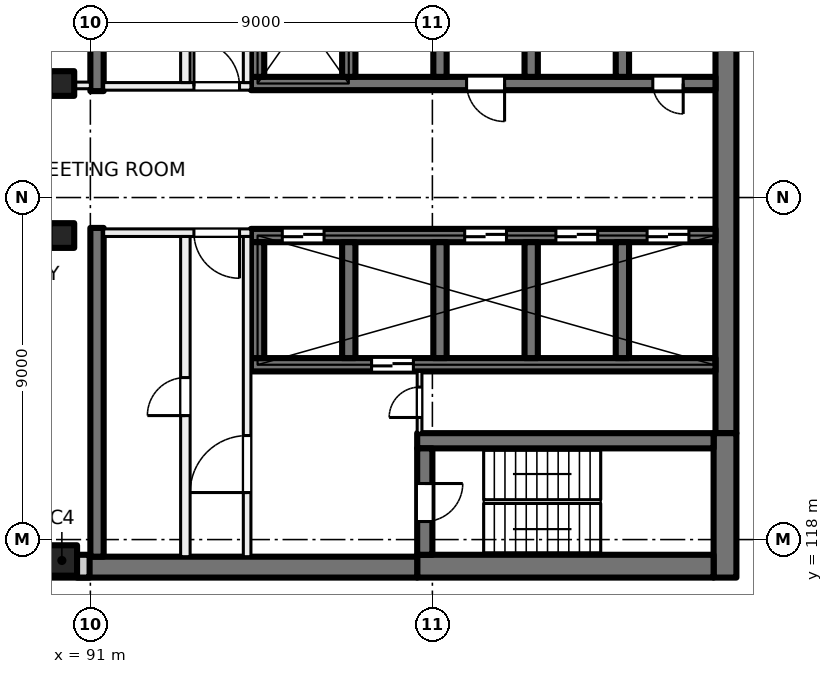
"""IFC4 building model, lengths in metres.
Left out: names, types, materials, properties, quantities, classifications, styles, units other than length and angle.
Written with IfcOpenShell. Run it as: python <this file> out.ifc"""

import sys

from ifc_helpers import new_model, si_unit, direction, frame, frame_2d, origin, origin_2d, place, context, subcontext, project, spatial, rectangle, extrude, element, fill, save


model = new_model("IFC4")
c1 = context("Model", 3, precision=1e-05, world=origin(), true_north=direction((0.0, 1.0)))
c2 = subcontext(c1, "Body", "Model", "MODEL_VIEW")
j1 = project(units=[si_unit("LENGTHUNIT", "METRE"), si_unit("PLANEANGLEUNIT", "RADIAN")], contexts=[c1])
p1 = place(None, origin())
s1 = spatial("IfcSite", under=j1, at=p1, CompositionType="ELEMENT")
p2 = place(p1, origin())
s2 = spatial("IfcBuilding", under=s1, at=p2, CompositionType="ELEMENT")
p3 = place(p2, frame((0.0, 0.0, 174.5)))
s3 = spatial("IfcBuildingStorey", under=s2, at=p3, CompositionType="ELEMENT", Elevation=174.5)
for number, where, z_axis, x_axis in (
    (1, (90.25, 130.0, 0.0), (0.0, 0.0, 1.0), (1.0, 0.0, 0.0)),
    (2, (90.25, 126.0, 0.0), (0.0, 0.0, 1.0), (1.0, 0.0, 0.0)),
):
    element("IfcColumn", number, at=place(p3, frame(where, z_axis=z_axis, x_axis=x_axis)), inside=s3, PredefinedType="COLUMN", context=c2, shape_type="SweptSolid", body=[
        extrude(rectangle(XDim=0.65, YDim=0.65, at=origin_2d()), origin(), (0.0, 0.0, 1.0), 4.0),
    ])
p4 = place(p3, frame((90.25, 117.45, 0.0), z_axis=(0.0, 0.0, 1.0), x_axis=(1.0, 0.0, 0.0)))
e3 = element("IfcColumn", 3, at=p4, inside=s3, PredefinedType="COLUMN", context=c2, shape_type="SweptSolid", body=[
    extrude(rectangle(XDim=0.8, YDim=0.8, at=origin_2d()), origin(), (0.0, 0.0, 1.0), 4.0),
])
p5 = place(p3, frame((107.725, 135.2, 0.0), z_axis=(0.0, 0.0, 1.0), x_axis=(0.0, -1.0, 0.0)))
e4 = element("IfcWall", 4, at=p5, inside=s3, PredefinedType="SHEAR", context=c2, shape_type="SweptSolid", body=[
    extrude(rectangle(XDim=14.4, YDim=0.55, at=frame_2d((7.2, 0.0))), origin(), (0.0, 0.0, 1.0), 4.0),
])
p6 = place(p3, frame((107.7, 120.8, 0.0), z_axis=(0.0, 0.0, 1.0), x_axis=(0.0, -1.0, 0.0)))
e5 = element("IfcWall", 5, at=p6, inside=s3, PredefinedType="SHEAR", context=c2, shape_type="SweptSolid", body=[
    extrude(rectangle(XDim=3.8, YDim=0.6, at=frame_2d((1.9, 0.0))), origin(), (0.0, 0.0, 1.0), 4.0),
])
p7 = place(p3, frame((107.4, 117.3, 0.0), z_axis=(0.0, 0.0, 1.0), x_axis=(-1.0, 0.0, 0.0)))
e6 = element("IfcWall", 6, at=p7, inside=s3, PredefinedType="SHEAR", context=c2, shape_type="SweptSolid", body=[
    extrude(rectangle(XDim=7.8, YDim=0.6, at=frame_2d((3.9, 0.0))), origin(), (0.0, 0.0, 1.0), 4.0),
])
p8 = place(p3, frame((99.6, 117.275, 0.0), z_axis=(0.0, 0.0, 1.0), x_axis=(-1.0, 0.0, 0.0)))
e7 = element("IfcWall", 7, at=p8, inside=s3, PredefinedType="SHEAR", context=c2, shape_type="SweptSolid", body=[
    extrude(rectangle(XDim=8.95, YDim=0.55, at=frame_2d((4.475, 0.0))), origin(), (0.0, 0.0, 1.0), 4.0),
])
p9 = place(p3, frame((107.4, 120.6, 0.0), z_axis=(0.0, 0.0, 1.0), x_axis=(-1.0, 0.0, 0.0)))
e8 = element("IfcWall", 8, at=p9, inside=s3, PredefinedType="SHEAR", context=c2, shape_type="SweptSolid", body=[
    extrude(rectangle(XDim=7.8, YDim=0.4, at=frame_2d((3.9, 0.0))), origin(), (0.0, 0.0, 1.0), 4.0),
])
p10 = place(p3, frame((99.8, 120.4, 0.0), z_axis=(0.0, 0.0, 1.0), x_axis=(0.0, -1.0, 0.0)))
e9 = element("IfcWall", 9, at=p10, inside=s3, PredefinedType="SHEAR", context=c2, shape_type="SweptSolid", body=[
    extrude(rectangle(XDim=2.8, YDim=0.4, at=frame_2d((1.4, 0.0))), origin(), (0.0, 0.0, 1.0), 4.0),
])
p11 = place(p10, frame((0.925, 0.0, 0.0)))
e10 = element("IfcOpeningElement", 10, at=p11, cuts=e9, PredefinedType="OPENING", context=c2, shape_type="SweptSolid", body=[
    extrude(rectangle(XDim=1.0, YDim=2.1, at=frame_2d((0.5, 1.05))), frame((0.0, 0.21, 0.0), z_axis=(0.0, -1.0, 0.0), x_axis=(1.0, 0.0, 0.0)), (0.0, 0.0, 1.0), 0.42),
])
p12 = place(p3, frame((107.45, 130.0, 0.0), z_axis=(0.0, 0.0, 1.0), x_axis=(-1.0, 0.0, 0.0)))
e11 = element("IfcWall", 11, at=p12, inside=s3, PredefinedType="SHEAR", context=c2, shape_type="SweptSolid", body=[
    extrude(rectangle(XDim=12.225, YDim=0.35, at=frame_2d((6.112, 0.0))), origin(), (0.0, 0.0, 1.0), 4.0),
])
p13 = place(p12, frame((0.85, 0.0, 0.0)))
e12 = element("IfcOpeningElement", 12, at=p13, cuts=e11, PredefinedType="OPENING", context=c2, shape_type="SweptSolid", body=[
    extrude(rectangle(XDim=0.8, YDim=2.1, at=frame_2d((0.4, 1.05))), frame((0.0, 0.185, 0.0), z_axis=(0.0, -1.0, 0.0), x_axis=(1.0, 0.0, 0.0)), (0.0, 0.0, 1.0), 0.37),
])
p14 = place(p12, frame((5.55, 0.0, 0.0)))
e13 = element("IfcOpeningElement", 13, at=p14, cuts=e11, PredefinedType="OPENING", context=c2, shape_type="SweptSolid", body=[
    extrude(rectangle(XDim=1.0, YDim=2.1, at=frame_2d((0.5, 1.05))), frame((0.0, 0.185, 0.0), z_axis=(0.0, -1.0, 0.0), x_axis=(1.0, 0.0, 0.0)), (0.0, 0.0, 1.0), 0.37),
])
for number, where, z_axis, x_axis in (
    (14, (105.0, 133.225, 0.0), (0.0, 0.0, 1.0), (0.0, -1.0, 0.0)),
    (15, (102.6, 133.225, 0.0), (0.0, 0.0, 1.0), (0.0, -1.0, 0.0)),
    (16, (100.2, 133.225, 0.0), (0.0, 0.0, 1.0), (0.0, -1.0, 0.0)),
    (17, (97.8, 133.225, 0.0), (0.0, 0.0, 1.0), (0.0, -1.0, 0.0)),
    (18, (95.4, 133.225, 0.0), (0.0, 0.0, 1.0), (0.0, -1.0, 0.0)),
):
    element("IfcWall", number, at=place(p3, frame(where, z_axis=z_axis, x_axis=x_axis)), inside=s3, PredefinedType="SHEAR", context=c2, shape_type="SweptSolid", body=[
        extrude(rectangle(XDim=3.05, YDim=0.35, at=frame_2d((1.525, 0.0))), origin(), (0.0, 0.0, 1.0), 4.0),
    ])
p15 = place(p3, frame((107.45, 126.0, 0.0), z_axis=(0.0, 0.0, 1.0), x_axis=(-1.0, 0.0, 0.0)))
e19 = element("IfcWall", 19, at=p15, inside=s3, PredefinedType="SHEAR", context=c2, shape_type="SweptSolid", body=[
    extrude(rectangle(XDim=12.225, YDim=0.35, at=frame_2d((6.112, 0.0))), origin(), (0.0, 0.0, 1.0), 4.0),
])
p16 = place(p15, frame((0.7, 0.0, 0.0)))
e20 = element("IfcOpeningElement", 20, at=p16, cuts=e19, PredefinedType="OPENING", context=c2, shape_type="SweptSolid", body=[
    extrude(rectangle(XDim=1.1, YDim=2.1, at=frame_2d((0.55, 1.05))), frame((0.0, 0.185, 0.0), z_axis=(0.0, -1.0, 0.0), x_axis=(1.0, 0.0, 0.0)), (0.0, 0.0, 1.0), 0.37),
])
p17 = place(p15, frame((3.1, 0.0, 0.0)))
e21 = element("IfcOpeningElement", 21, at=p17, cuts=e19, PredefinedType="OPENING", context=c2, shape_type="SweptSolid", body=[
    extrude(rectangle(XDim=1.1, YDim=2.1, at=frame_2d((0.55, 1.05))), frame((0.0, 0.185, 0.0), z_axis=(0.0, -1.0, 0.0), x_axis=(1.0, 0.0, 0.0)), (0.0, 0.0, 1.0), 0.37),
])
p18 = place(p15, frame((5.5, 0.0, 0.0)))
e22 = element("IfcOpeningElement", 22, at=p18, cuts=e19, PredefinedType="OPENING", context=c2, shape_type="SweptSolid", body=[
    extrude(rectangle(XDim=1.1, YDim=2.1, at=frame_2d((0.55, 1.05))), frame((0.0, 0.185, 0.0), z_axis=(0.0, -1.0, 0.0), x_axis=(1.0, 0.0, 0.0)), (0.0, 0.0, 1.0), 0.37),
])
p19 = place(p15, frame((10.3, 0.0, 0.0)))
e23 = element("IfcOpeningElement", 23, at=p19, cuts=e19, PredefinedType="OPENING", context=c2, shape_type="SweptSolid", body=[
    extrude(rectangle(XDim=1.1, YDim=2.1, at=frame_2d((0.55, 1.05))), frame((0.0, 0.185, 0.0), z_axis=(0.0, -1.0, 0.0), x_axis=(1.0, 0.0, 0.0)), (0.0, 0.0, 1.0), 0.37),
])
p20 = place(p3, frame((107.45, 122.6, 0.0), z_axis=(0.0, 0.0, 1.0), x_axis=(-1.0, 0.0, 0.0)))
e24 = element("IfcWall", 24, at=p20, inside=s3, PredefinedType="SHEAR", context=c2, shape_type="SweptSolid", body=[
    extrude(rectangle(XDim=12.225, YDim=0.35, at=frame_2d((6.112, 0.0))), origin(), (0.0, 0.0, 1.0), 4.0),
])
p21 = place(p20, frame((7.95, 0.0, 0.0)))
e25 = element("IfcOpeningElement", 25, at=p21, cuts=e24, PredefinedType="OPENING", context=c2, shape_type="SweptSolid", body=[
    extrude(rectangle(XDim=1.1, YDim=2.1, at=frame_2d((0.55, 1.05))), frame((0.0, 0.185, 0.0), z_axis=(0.0, -1.0, 0.0), x_axis=(1.0, 0.0, 0.0)), (0.0, 0.0, 1.0), 0.37),
])
for number, where, z_axis, x_axis in (
    (26, (105.0, 125.825, 0.0), (0.0, 0.0, 1.0), (0.0, -1.0, 0.0)),
    (27, (102.6, 125.825, 0.0), (0.0, 0.0, 1.0), (0.0, -1.0, 0.0)),
    (28, (100.2, 125.825, 0.0), (0.0, 0.0, 1.0), (0.0, -1.0, 0.0)),
    (29, (97.8, 125.825, 0.0), (0.0, 0.0, 1.0), (0.0, -1.0, 0.0)),
    (30, (95.4, 125.825, 0.0), (0.0, 0.0, 1.0), (0.0, -1.0, 0.0)),
):
    element("IfcWall", number, at=place(p3, frame(where, z_axis=z_axis, x_axis=x_axis)), inside=s3, PredefinedType="SHEAR", context=c2, shape_type="SweptSolid", body=[
        extrude(rectangle(XDim=3.05, YDim=0.35, at=frame_2d((1.525, 0.0))), origin(), (0.0, 0.0, 1.0), 4.0),
    ])
for number, where, z_axis, x_axis in (
    (31, (91.175, 138.45, 0.0), (0.0, 0.0, 1.0), (0.0, -1.0, 0.0)),
    (32, (91.175, 126.2, 0.0), (0.0, 0.0, 1.0), (0.0, -1.0, 0.0)),
):
    element("IfcWall", number, at=place(p3, frame(where, z_axis=z_axis, x_axis=x_axis)), inside=s3, PredefinedType="SHEAR", context=c2, shape_type="SweptSolid", body=[
        extrude(rectangle(XDim=8.65, YDim=0.35, at=frame_2d((4.325, 0.0))), origin(), (0.0, 0.0, 1.0), 4.0),
    ])
p22 = place(p3, frame((90.98, 117.3, 0.0), z_axis=(0.0, 0.0, 1.0), x_axis=(-1.0, 0.0, 0.0)))
e33 = element("IfcWall", 33, at=p22, inside=s3, PredefinedType="SOLIDWALL", context=c2, shape_type="SweptSolid", body=[
    extrude(rectangle(XDim=33.745, YDim=0.6, at=frame_2d((16.873, 0.0))), origin(), (0.0, 0.0, 1.0), 3.625),
])
p23 = place(p22, frame((1.48, 0.0, 0.9)))
e34 = element("IfcOpeningElement", 34, at=p23, cuts=e33, PredefinedType="OPENING", context=c2, shape_type="SweptSolid", body=[
    extrude(rectangle(XDim=3.0, YDim=2.4, at=frame_2d((1.5, 1.2))), frame((0.0, 0.31, 0.0), z_axis=(0.0, -1.0, 0.0), x_axis=(1.0, 0.0, 0.0)), (0.0, 0.0, 1.0), 0.62),
])
p24 = place(p22, frame((5.98, 0.0, 0.9)))
e35 = element("IfcOpeningElement", 35, at=p24, cuts=e33, PredefinedType="OPENING", context=c2, shape_type="SweptSolid", body=[
    extrude(rectangle(XDim=3.0, YDim=2.4, at=frame_2d((1.5, 1.2))), frame((0.0, 0.31, 0.0), z_axis=(0.0, -1.0, 0.0), x_axis=(1.0, 0.0, 0.0)), (0.0, 0.0, 1.0), 0.62),
])
p25 = place(p22, frame((10.48, 0.0, 0.9)))
e36 = element("IfcOpeningElement", 36, at=p25, cuts=e33, PredefinedType="OPENING", context=c2, shape_type="SweptSolid", body=[
    extrude(rectangle(XDim=3.0, YDim=2.4, at=frame_2d((1.5, 1.2))), frame((0.0, 0.31, 0.0), z_axis=(0.0, -1.0, 0.0), x_axis=(1.0, 0.0, 0.0)), (0.0, 0.0, 1.0), 0.62),
])
p26 = place(p22, frame((14.98, 0.0, 0.9)))
e37 = element("IfcOpeningElement", 37, at=p26, cuts=e33, PredefinedType="OPENING", context=c2, shape_type="SweptSolid", body=[
    extrude(rectangle(XDim=3.0, YDim=2.4, at=frame_2d((1.5, 1.2))), frame((0.0, 0.31, 0.0), z_axis=(0.0, -1.0, 0.0), x_axis=(1.0, 0.0, 0.0)), (0.0, 0.0, 1.0), 0.62),
])
p27 = place(p22, frame((19.48, 0.0, 0.9)))
e38 = element("IfcOpeningElement", 38, at=p27, cuts=e33, PredefinedType="OPENING", context=c2, shape_type="SweptSolid", body=[
    extrude(rectangle(XDim=3.0, YDim=2.4, at=frame_2d((1.5, 1.2))), frame((0.0, 0.31, 0.0), z_axis=(0.0, -1.0, 0.0), x_axis=(1.0, 0.0, 0.0)), (0.0, 0.0, 1.0), 0.62),
])
p28 = place(p22, frame((23.98, 0.0, 0.9)))
e39 = element("IfcOpeningElement", 39, at=p28, cuts=e33, PredefinedType="OPENING", context=c2, shape_type="SweptSolid", body=[
    extrude(rectangle(XDim=3.0, YDim=2.4, at=frame_2d((1.5, 1.2))), frame((0.0, 0.31, 0.0), z_axis=(0.0, -1.0, 0.0), x_axis=(1.0, 0.0, 0.0)), (0.0, 0.0, 1.0), 0.62),
])
p29 = place(p22, frame((28.48, 0.0, 0.9)))
e40 = element("IfcOpeningElement", 40, at=p29, cuts=e33, PredefinedType="OPENING", context=c2, shape_type="SweptSolid", body=[
    extrude(rectangle(XDim=3.0, YDim=2.4, at=frame_2d((1.5, 1.2))), frame((0.0, 0.31, 0.0), z_axis=(0.0, -1.0, 0.0), x_axis=(1.0, 0.0, 0.0)), (0.0, 0.0, 1.0), 0.62),
])
p30 = place(p3, frame((95.225, 126.075, 0.0), z_axis=(0.0, 0.0, 1.0), x_axis=(-1.0, 0.0, 0.0)))
e41 = element("IfcWall", 41, at=p30, inside=s3, PredefinedType="PARTITIONING", context=c2, shape_type="SweptSolid", body=[
    extrude(rectangle(XDim=3.875, YDim=0.2, at=frame_2d((1.938, 0.0))), origin(), (0.0, 0.0, 1.0), 3.625),
])
p31 = place(p30, frame((0.3, 0.0, 0.0)))
e42 = element("IfcOpeningElement", 42, at=p31, cuts=e41, PredefinedType="OPENING", context=c2, shape_type="SweptSolid", body=[
    extrude(rectangle(XDim=1.2, YDim=2.1, at=frame_2d((0.6, 1.05))), frame((0.0, 0.11, 0.0), z_axis=(0.0, -1.0, 0.0), x_axis=(1.0, 0.0, 0.0)), (0.0, 0.0, 1.0), 0.22),
])
p32 = place(p3, frame((95.125, 117.55, 0.0), z_axis=(0.0, 0.0, 1.0), x_axis=(0.0, 1.0, 0.0)))
e43 = element("IfcWall", 43, at=p32, inside=s3, PredefinedType="PARTITIONING", context=c2, shape_type="SweptSolid", body=[
    extrude(rectangle(XDim=8.425, YDim=0.2, at=frame_2d((4.212, 0.0))), origin(), (0.0, 0.0, 1.0), 3.625),
])
p33 = place(p32, frame((1.688, 0.0, 0.0)))
e44 = element("IfcOpeningElement", 44, at=p33, cuts=e43, PredefinedType="OPENING", context=c2, shape_type="SweptSolid", body=[
    extrude(rectangle(XDim=1.5, YDim=2.1, at=frame_2d((0.75, 1.05))), frame((0.0, 0.11, 0.0), z_axis=(0.0, -1.0, 0.0), x_axis=(1.0, 0.0, 0.0)), (0.0, 0.0, 1.0), 0.22),
])
p34 = place(p3, frame((93.5, 117.55, 0.0), z_axis=(0.0, 0.0, 1.0), x_axis=(0.0, 1.0, 0.0)))
e45 = element("IfcWall", 45, at=p34, inside=s3, PredefinedType="PARTITIONING", context=c2, shape_type="SweptSolid", body=[
    extrude(rectangle(XDim=8.425, YDim=0.25, at=frame_2d((4.212, 0.0))), origin(), (0.0, 0.0, 1.0), 3.625),
])
p35 = place(p34, frame((3.712, 0.0, 0.0)))
e46 = element("IfcOpeningElement", 46, at=p35, cuts=e45, PredefinedType="OPENING", context=c2, shape_type="SweptSolid", body=[
    extrude(rectangle(XDim=1.0, YDim=2.1, at=frame_2d((0.5, 1.05))), frame((0.0, 0.135, 0.0), z_axis=(0.0, -1.0, 0.0), x_axis=(1.0, 0.0, 0.0)), (0.0, 0.0, 1.0), 0.27),
])
p36 = place(p3, frame((99.663, 120.8, 0.0), z_axis=(0.0, 0.0, 1.0), x_axis=(0.0, 1.0, 0.0)))
e47 = element("IfcWall", 47, at=p36, inside=s3, PredefinedType="PARTITIONING", context=c2, shape_type="SweptSolid", body=[
    extrude(rectangle(XDim=1.625, YDim=0.125, at=frame_2d((0.812, 0.0))), origin(), (0.0, 0.0, 1.0), 3.625),
])
p37 = place(p36, frame((0.413, 0.0, 0.0)))
e48 = element("IfcOpeningElement", 48, at=p37, cuts=e47, PredefinedType="OPENING", context=c2, shape_type="SweptSolid", body=[
    extrude(rectangle(XDim=0.8, YDim=2.1, at=frame_2d((0.4, 1.05))), frame((0.0, 0.073, 0.0), z_axis=(0.0, -1.0, 0.0), x_axis=(1.0, 0.0, 0.0)), (0.0, 0.0, 1.0), 0.145),
])
p38 = place(p3, frame((91.35, 129.925, 0.0), z_axis=(0.0, 0.0, 1.0), x_axis=(1.0, 0.0, 0.0)))
e49 = element("IfcWall", 49, at=p38, inside=s3, PredefinedType="PARTITIONING", context=c2, shape_type="SweptSolid", body=[
    extrude(rectangle(XDim=3.875, YDim=0.2, at=frame_2d((1.938, 0.0))), origin(), (0.0, 0.0, 1.0), 3.625),
])
p39 = place(p38, frame((2.375, 0.0, 0.0)))
e50 = element("IfcOpeningElement", 50, at=p39, cuts=e49, PredefinedType="OPENING", context=c2, shape_type="SweptSolid", body=[
    extrude(rectangle(XDim=1.2, YDim=2.1, at=frame_2d((0.6, 1.05))), frame((0.0, 0.11, 0.0), z_axis=(0.0, -1.0, 0.0), x_axis=(1.0, 0.0, 0.0)), (0.0, 0.0, 1.0), 0.22),
])
p40 = place(p3, frame((95.125, 130.025, 0.0), z_axis=(0.0, 0.0, 1.0), x_axis=(0.0, 1.0, 0.0)))
e51 = element("IfcWall", 51, at=p40, inside=s3, PredefinedType="PARTITIONING", context=c2, shape_type="SweptSolid", body=[
    extrude(rectangle(XDim=8.425, YDim=0.2, at=frame_2d((4.212, 0.0))), origin(), (0.0, 0.0, 1.0), 3.625),
])
p41 = place(p40, frame((5.238, 0.0, 0.0)))
e52 = element("IfcOpeningElement", 52, at=p41, cuts=e51, PredefinedType="OPENING", context=c2, shape_type="SweptSolid", body=[
    extrude(rectangle(XDim=1.5, YDim=2.1, at=frame_2d((0.75, 1.05))), frame((0.0, 0.11, 0.0), z_axis=(0.0, -1.0, 0.0), x_axis=(1.0, 0.0, 0.0)), (0.0, 0.0, 1.0), 0.22),
])
p42 = place(p3, frame((93.5, 130.025, 0.0), z_axis=(0.0, 0.0, 1.0), x_axis=(0.0, 1.0, 0.0)))
e53 = element("IfcWall", 53, at=p42, inside=s3, PredefinedType="PARTITIONING", context=c2, shape_type="SweptSolid", body=[
    extrude(rectangle(XDim=8.425, YDim=0.25, at=frame_2d((4.212, 0.0))), origin(), (0.0, 0.0, 1.0), 3.625),
])
p43 = place(p42, frame((3.812, 0.0, 0.0)))
e54 = element("IfcOpeningElement", 54, at=p43, cuts=e53, PredefinedType="OPENING", context=c2, shape_type="SweptSolid", body=[
    extrude(rectangle(XDim=0.8, YDim=2.1, at=frame_2d((0.4, 1.05))), frame((0.0, 0.135, 0.0), z_axis=(0.0, -1.0, 0.0), x_axis=(1.0, 0.0, 0.0)), (0.0, 0.0, 1.0), 0.27),
])
p44 = place(p3, frame((85.838, 129.95, 0.0), z_axis=(0.0, 0.0, 1.0), x_axis=(1.0, 0.0, 0.0)))
e55 = element("IfcWall", 55, at=p44, inside=s3, PredefinedType="PARTITIONING", context=c2, shape_type="SweptSolid", body=[
    extrude(rectangle(XDim=5.162, YDim=0.175, at=frame_2d((2.581, 0.0))), origin(), (0.0, 0.0, 1.0), 3.625),
])
p45 = place(p44, frame((1.971, 0.0, 0.0)))
e56 = element("IfcOpeningElement", 56, at=p45, cuts=e55, PredefinedType="OPENING", context=c2, shape_type="SweptSolid", body=[
    extrude(rectangle(XDim=1.2, YDim=2.1, at=frame_2d((0.6, 1.05))), frame((0.0, 0.097, 0.0), z_axis=(0.0, -1.0, 0.0), x_axis=(1.0, 0.0, 0.0)), (0.0, 0.0, 1.0), 0.195),
])
p46 = place(p16, origin())
e57 = element("IfcDoor", 57, at=p46, inside=s3, OperationType="DOUBLE_DOOR_SLIDING", PredefinedType="DOOR", context=c2, shape_type="SweptSolid", body=[
    extrude(rectangle(XDim=1.1, YDim=2.1, at=frame_2d((0.55, 1.05))), frame((0.0, 0.025, 0.0), z_axis=(0.0, -1.0, 0.0), x_axis=(1.0, 0.0, 0.0)), (0.0, 0.0, 1.0), 0.05),
])
fill(e20, e57)
p47 = place(p17, origin())
e58 = element("IfcDoor", 58, at=p47, inside=s3, OperationType="DOUBLE_DOOR_SLIDING", PredefinedType="DOOR", context=c2, shape_type="SweptSolid", body=[
    extrude(rectangle(XDim=1.1, YDim=2.1, at=frame_2d((0.55, 1.05))), frame((0.0, 0.025, 0.0), z_axis=(0.0, -1.0, 0.0), x_axis=(1.0, 0.0, 0.0)), (0.0, 0.0, 1.0), 0.05),
])
fill(e21, e58)
p48 = place(p18, origin())
e59 = element("IfcDoor", 59, at=p48, inside=s3, OperationType="DOUBLE_DOOR_SLIDING", PredefinedType="DOOR", context=c2, shape_type="SweptSolid", body=[
    extrude(rectangle(XDim=1.1, YDim=2.1, at=frame_2d((0.55, 1.05))), frame((0.0, 0.025, 0.0), z_axis=(0.0, -1.0, 0.0), x_axis=(1.0, 0.0, 0.0)), (0.0, 0.0, 1.0), 0.05),
])
fill(e22, e59)
p49 = place(p19, origin())
e60 = element("IfcDoor", 60, at=p49, inside=s3, OperationType="DOUBLE_DOOR_SLIDING", PredefinedType="DOOR", context=c2, shape_type="SweptSolid", body=[
    extrude(rectangle(XDim=1.1, YDim=2.1, at=frame_2d((0.55, 1.05))), frame((0.0, 0.025, 0.0), z_axis=(0.0, -1.0, 0.0), x_axis=(1.0, 0.0, 0.0)), (0.0, 0.0, 1.0), 0.05),
])
fill(e23, e60)
p50 = place(p13, origin())
e61 = element("IfcDoor", 61, at=p50, inside=s3, OperationType="SINGLE_SWING_LEFT", PredefinedType="DOOR", context=c2, shape_type="SweptSolid", body=[
    extrude(rectangle(XDim=0.8, YDim=2.1, at=frame_2d((0.4, 1.05))), frame((0.0, 0.025, 0.0), z_axis=(0.0, -1.0, 0.0), x_axis=(1.0, 0.0, 0.0)), (0.0, 0.0, 1.0), 0.05),
])
fill(e12, e61)
p51 = place(p14, origin())
e62 = element("IfcDoor", 62, at=p51, inside=s3, OperationType="SINGLE_SWING_RIGHT", PredefinedType="DOOR", context=c2, shape_type="SweptSolid", body=[
    extrude(rectangle(XDim=1.0, YDim=2.1, at=frame_2d((0.5, 1.05))), frame((0.0, 0.025, 0.0), z_axis=(0.0, -1.0, 0.0), x_axis=(1.0, 0.0, 0.0)), (0.0, 0.0, 1.0), 0.05),
])
fill(e13, e62)
p52 = place(p31, origin())
e63 = element("IfcDoor", 63, at=p52, inside=s3, OperationType="DOUBLE_DOOR_SINGLE_SWING", PredefinedType="DOOR", context=c2, shape_type="SweptSolid", body=[
    extrude(rectangle(XDim=1.2, YDim=2.1, at=frame_2d((0.6, 1.05))), frame((0.0, 0.025, 0.0), z_axis=(0.0, -1.0, 0.0), x_axis=(1.0, 0.0, 0.0)), (0.0, 0.0, 1.0), 0.05),
])
fill(e42, e63)
p53 = place(p33, origin())
e64 = element("IfcDoor", 64, at=p53, inside=s3, OperationType="DOUBLE_DOOR_SINGLE_SWING", PredefinedType="DOOR", context=c2, shape_type="SweptSolid", body=[
    extrude(rectangle(XDim=1.5, YDim=2.1, at=frame_2d((0.75, 1.05))), frame((0.0, 0.025, 0.0), z_axis=(0.0, -1.0, 0.0), x_axis=(1.0, 0.0, 0.0)), (0.0, 0.0, 1.0), 0.05),
])
fill(e44, e64)
p54 = place(p11, origin())
e65 = element("IfcDoor", 65, at=p54, inside=s3, OperationType="SINGLE_SWING_LEFT", PredefinedType="DOOR", context=c2, shape_type="SweptSolid", body=[
    extrude(rectangle(XDim=1.0, YDim=2.1, at=frame_2d((0.5, 1.05))), frame((0.0, 0.025, 0.0), z_axis=(0.0, -1.0, 0.0), x_axis=(1.0, 0.0, 0.0)), (0.0, 0.0, 1.0), 0.05),
])
fill(e10, e65)
p55 = place(p37, origin())
e66 = element("IfcDoor", 66, at=p55, inside=s3, OperationType="SINGLE_SWING_RIGHT", PredefinedType="DOOR", context=c2, shape_type="SweptSolid", body=[
    extrude(rectangle(XDim=0.8, YDim=2.1, at=frame_2d((0.4, 1.05))), frame((0.0, 0.025, 0.0), z_axis=(0.0, -1.0, 0.0), x_axis=(1.0, 0.0, 0.0)), (0.0, 0.0, 1.0), 0.05),
])
fill(e48, e66)
p56 = place(p35, origin())
e67 = element("IfcDoor", 67, at=p56, inside=s3, OperationType="SINGLE_SWING_LEFT", PredefinedType="DOOR", context=c2, shape_type="SweptSolid", body=[
    extrude(rectangle(XDim=1.0, YDim=2.1, at=frame_2d((0.5, 1.05))), frame((0.0, 0.025, 0.0), z_axis=(0.0, -1.0, 0.0), x_axis=(1.0, 0.0, 0.0)), (0.0, 0.0, 1.0), 0.05),
])
fill(e46, e67)
p57 = place(p39, origin())
e68 = element("IfcDoor", 68, at=p57, inside=s3, OperationType="DOUBLE_DOOR_SINGLE_SWING", PredefinedType="DOOR", context=c2, shape_type="SweptSolid", body=[
    extrude(rectangle(XDim=1.2, YDim=2.1, at=frame_2d((0.6, 1.05))), frame((0.0, 0.025, 0.0), z_axis=(0.0, -1.0, 0.0), x_axis=(1.0, 0.0, 0.0)), (0.0, 0.0, 1.0), 0.05),
])
fill(e50, e68)
p58 = place(p21, origin())
e69 = element("IfcDoor", 69, at=p58, inside=s3, OperationType="DOUBLE_DOOR_SLIDING", PredefinedType="DOOR", context=c2, shape_type="SweptSolid", body=[
    extrude(rectangle(XDim=1.1, YDim=2.1, at=frame_2d((0.55, 1.05))), frame((0.0, 0.025, 0.0), z_axis=(0.0, -1.0, 0.0), x_axis=(1.0, 0.0, 0.0)), (0.0, 0.0, 1.0), 0.05),
])
fill(e25, e69)
save(model, sys.argv[1])
